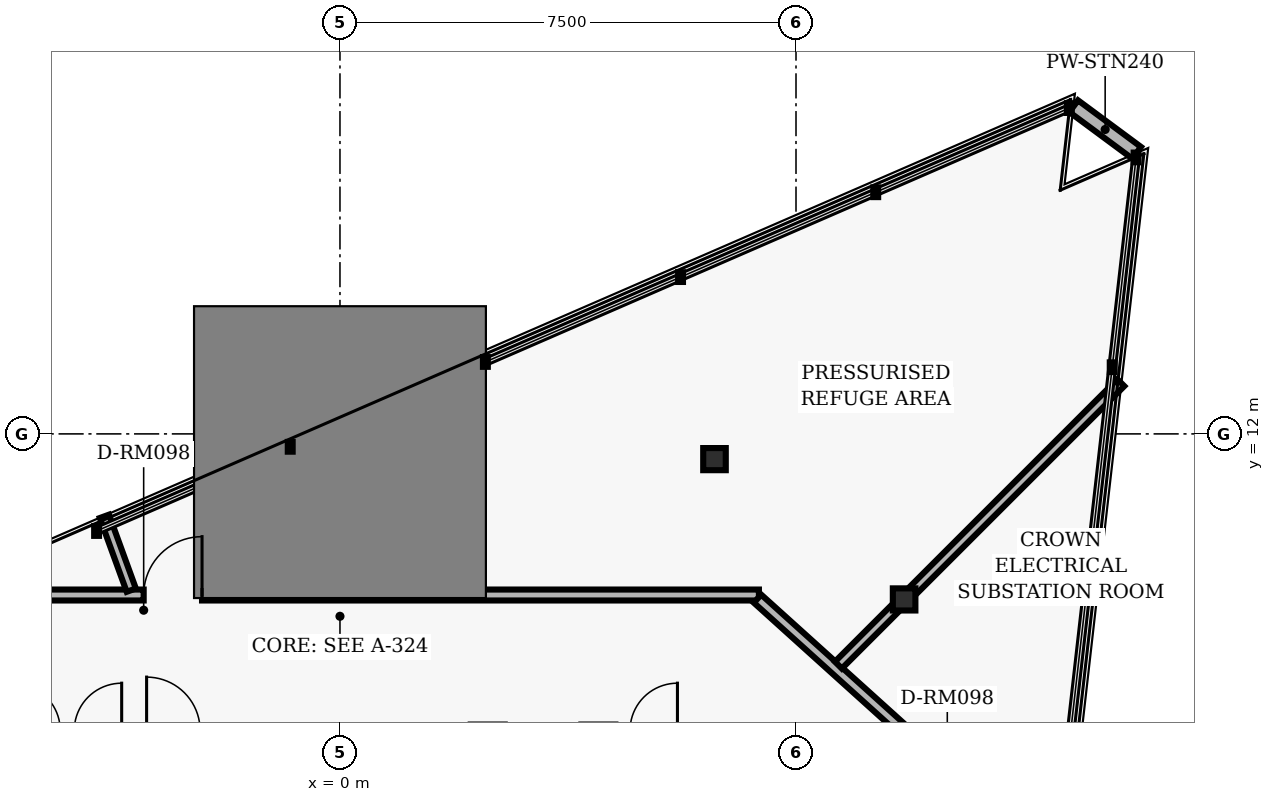
"""IFC4 building model, lengths in metres.
Left out: names, types, materials, properties, quantities, classifications, styles, units other than length and angle.
Written with IfcOpenShell. Run it as: python <this file> out.ifc"""

import sys

from ifc_helpers import new_model, si_unit, direction, frame, frame_2d, origin, origin_2d, place, context, subcontext, project, spatial, rectangle, i_section, extrude, element, fill, save


model = new_model("IFC4")
c1 = context("Model", 3, precision=1e-05, world=origin(), true_north=direction((0.0, 1.0)))
c2 = subcontext(c1, "Body", "Model", "MODEL_VIEW")
j1 = project(units=[si_unit("LENGTHUNIT", "METRE"), si_unit("PLANEANGLEUNIT", "RADIAN")], contexts=[c1])
p1 = place(None, origin())
s1 = spatial("IfcSite", under=j1, at=p1, CompositionType="ELEMENT")
p2 = place(p1, origin())
s2 = spatial("IfcBuilding", under=s1, at=p2, CompositionType="ELEMENT")
p3 = place(p2, frame((0.0, 0.0, 239.2)))
s3 = spatial("IfcBuildingStorey", under=s2, at=p3, CompositionType="ELEMENT", Elevation=239.2)
for number, where, z_axis, x_axis in (
    (1, (9.278, 9.277, 0.0), (0.0, 0.0, 1.0), (1.0, 0.0, 0.0)),
    (2, (6.159, 11.585, 0.0), (0.0, 0.0, 1.0), (1.0, 0.0, 0.0)),
):
    element("IfcColumn", number, at=place(p3, frame(where, z_axis=z_axis, x_axis=x_axis)), inside=s3, PredefinedType="COLUMN", context=c2, shape_type="SweptSolid", body=[
        extrude(i_section(OverallWidth=0.371, OverallDepth=0.364, WebThickness=0.013, FlangeThickness=0.022, FilletRadius=0.015, at=origin_2d()), origin(), (0.0, 0.0, 1.0), 4.16),
    ])
p4 = place(p3, frame((13.102, 16.624, 0.0), z_axis=(0.0, 0.0, 1.0), x_axis=(-0.803872713746, 0.59480136188, 0.0)))
e3 = element("IfcWall", 3, at=p4, inside=s3, PredefinedType="PARAPET", context=c2, shape_type="SweptSolid", body=[
    extrude(rectangle(XDim=1.288, YDim=0.24, at=frame_2d((0.644, 0.0))), origin(), (0.0, 0.0, 1.0), 3.448),
])
p5 = place(p3, frame((-6.394, 9.35, 0.0), z_axis=(0.0, 0.0, 1.0), x_axis=(1.0, 0.0, 0.0)))
e4 = element("IfcWall", 4, at=p5, inside=s3, PredefinedType="PARTITIONING", context=c2, shape_type="SweptSolid", body=[
    extrude(rectangle(XDim=13.284, YDim=0.18, at=frame_2d((6.642, 0.0))), origin(), (0.0, 0.0, 1.0), 3.903),
])
p6 = place(p5, frame((3.166, 0.0, 0.0)))
e5 = element("IfcOpeningElement", 5, at=p6, cuts=e4, PredefinedType="OPENING", context=c2, shape_type="SweptSolid", body=[
    extrude(rectangle(XDim=0.96, YDim=2.02, at=frame_2d((0.48, 1.01))), frame((0.0, 0.1, 0.0), z_axis=(0.0, -1.0, 0.0), x_axis=(1.0, 0.0, 0.0)), (0.0, 0.0, 1.0), 0.2),
])
p7 = place(p3, frame((6.867, 9.29, 0.0), z_axis=(0.0, 0.0, 1.0), x_axis=(0.742486327971, -0.669861219042, 0.0)))
e6 = element("IfcWall", 6, at=p7, inside=s3, PredefinedType="PARTITIONING", context=c2, shape_type="SweptSolid", body=[
    extrude(rectangle(XDim=6.196, YDim=0.18, at=frame_2d((3.098, 0.0))), origin(), (0.0, 0.0, 1.0), 3.903),
])
p8 = place(p7, frame((4.429, 0.0, 0.0)))
e7 = element("IfcOpeningElement", 7, at=p8, cuts=e6, PredefinedType="OPENING", context=c2, shape_type="SweptSolid", body=[
    extrude(rectangle(XDim=0.96, YDim=2.02, at=frame_2d((0.48, 1.01))), frame((0.0, 0.1, 0.0), z_axis=(0.0, -1.0, 0.0), x_axis=(1.0, 0.0, 0.0)), (0.0, 0.0, 1.0), 0.2),
])
p9 = place(p3, frame((8.197, 8.197, 0.0), z_axis=(0.0, 0.0, 1.0), x_axis=(0.707106781187, 0.707106781187, 0.0)))
e8 = element("IfcWall", 8, at=p9, inside=s3, PredefinedType="PARTITIONING", context=c2, shape_type="SweptSolid", body=[
    extrude(rectangle(XDim=6.569, YDim=0.16, at=frame_2d((3.285, 0.0))), origin(), (0.0, 0.0, 1.0), 3.433),
])
p10 = place(p3, frame((-3.432, 9.43, 0.0), z_axis=(0.0, 0.0, 1.0), x_axis=(-0.342016142969, 0.939694076787, 0.0)))
e9 = element("IfcWall", 9, at=p10, inside=s3, PredefinedType="PARTITIONING", context=c2, shape_type="SweptSolid", body=[
    extrude(rectangle(XDim=1.292, YDim=0.16, at=frame_2d((0.646, 0.0))), origin(), (0.0, 0.0, 1.0), 3.903),
])
p11 = place(p6, origin())
e10 = element("IfcDoor", 10, at=p11, inside=s3, OperationType="SINGLE_SWING_RIGHT", PredefinedType="DOOR", context=c2, shape_type="SweptSolid", body=[
    extrude(rectangle(XDim=0.96, YDim=2.02, at=frame_2d((0.48, 1.01))), frame((0.0, 0.025, 0.0), z_axis=(0.0, -1.0, 0.0), x_axis=(1.0, 0.0, 0.0)), (0.0, 0.0, 1.0), 0.05),
])
fill(e5, e10)
save(model, sys.argv[1])
